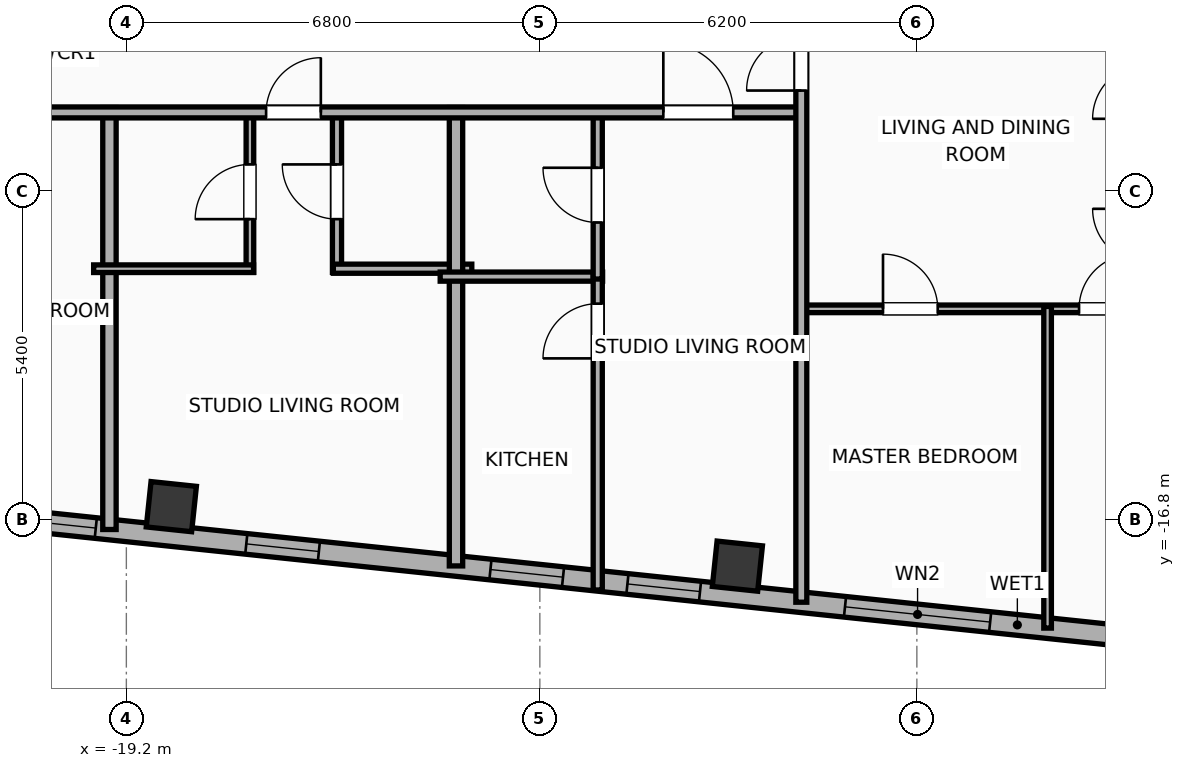
"""IFC4 building model, lengths in metres.
Left out: names, types, materials, properties, quantities, classifications, styles, units other than length and angle.
Written with IfcOpenShell. Run it as: python <this file> out.ifc"""

import sys

from ifc_helpers import new_model, si_unit, direction, frame, frame_2d, origin, origin_2d, place, context, subcontext, project, spatial, rectangle, hollow_rectangle, extrude, element, fill, save


model = new_model("IFC4")
c1 = context("Model", 3, precision=1e-05, world=origin(), true_north=direction((0.0, 1.0)))
c2 = subcontext(c1, "Body", "Model", "MODEL_VIEW")
j1 = project(units=[si_unit("LENGTHUNIT", "METRE"), si_unit("PLANEANGLEUNIT", "RADIAN")], contexts=[c1])
p1 = place(None, origin())
s1 = spatial("IfcSite", under=j1, at=p1, CompositionType="ELEMENT")
p2 = place(p1, origin())
s2 = spatial("IfcBuilding", under=s1, at=p2, CompositionType="ELEMENT")
p3 = place(p2, frame((0.0, 0.0, 260.0)))
s3 = spatial("IfcBuildingStorey", under=s2, at=p3, CompositionType="ELEMENT", Elevation=260.0)
for number, where, z_axis, x_axis in (
    (1, (-18.46, -16.583, 0.0), (0.0, 0.0, 1.0), (0.995, -0.105, 0.0)),
    (2, (-9.152, -17.561, 0.0), (0.0, 0.0, 1.0), (0.995, -0.105, 0.0)),
):
    element("IfcColumn", number, at=place(p3, frame(where, z_axis=z_axis, x_axis=x_axis)), inside=s3, PredefinedType="COLUMN", context=c2, shape_type="SweptSolid", body=[
        extrude(hollow_rectangle(XDim=0.75, YDim=0.75, WallThickness=0.025, at=origin_2d()), origin(), (0.0, 0.0, 1.0), 3.9),
    ])
p4 = place(p3, frame((18.708, -20.972, 0.0), z_axis=(0.0, 0.0, 1.0), x_axis=(-0.994521888554, 0.104528528102, 0.0)))
e3 = element("IfcWall", 3, at=p4, inside=s3, PredefinedType="ELEMENTEDWALL", context=c2, shape_type="SweptSolid", body=[
    extrude(rectangle(XDim=46.766, YDim=0.34, at=frame_2d((23.383, 0.0))), origin(), (0.0, 0.0, 1.0), 2.54),
])
p5 = place(p4, frame((23.833, 0.0, 0.75)))
e4 = element("IfcOpeningElement", 4, at=p5, cuts=e3, PredefinedType="OPENING", context=c2, shape_type="SweptSolid", body=[
    extrude(rectangle(XDim=2.4, YDim=1.63, at=frame_2d((1.2, 0.815))), frame((0.0, 0.18, 0.0), z_axis=(0.0, -1.0, 0.0), x_axis=(1.0, 0.0, 0.0)), (0.0, 0.0, 1.0), 0.36),
])
p6 = place(p4, frame((38.622, 0.0, 0.75)))
e5 = element("IfcOpeningElement", 5, at=p6, cuts=e3, PredefinedType="OPENING", context=c2, shape_type="SweptSolid", body=[
    extrude(rectangle(XDim=2.4, YDim=1.63, at=frame_2d((1.2, 0.815))), frame((0.0, 0.18, 0.0), z_axis=(0.0, -1.0, 0.0), x_axis=(1.0, 0.0, 0.0)), (0.0, 0.0, 1.0), 0.36),
])
p7 = place(p4, frame((44.402, 0.0, 0.75)))
e6 = element("IfcOpeningElement", 6, at=p7, cuts=e3, PredefinedType="OPENING", context=c2, shape_type="SweptSolid", body=[
    extrude(rectangle(XDim=1.2, YDim=1.63, at=frame_2d((0.6, 0.815))), frame((0.0, 0.18, 0.0), z_axis=(0.0, -1.0, 0.0), x_axis=(1.0, 0.0, 0.0)), (0.0, 0.0, 1.0), 0.36),
])
p8 = place(p4, frame((42.406, 0.0, 0.75)))
e7 = element("IfcOpeningElement", 7, at=p8, cuts=e3, PredefinedType="OPENING", context=c2, shape_type="SweptSolid", body=[
    extrude(rectangle(XDim=1.2, YDim=1.63, at=frame_2d((0.6, 0.815))), frame((0.0, 0.18, 0.0), z_axis=(0.0, -1.0, 0.0), x_axis=(1.0, 0.0, 0.0)), (0.0, 0.0, 1.0), 0.36),
])
p9 = place(p4, frame((34.933, 0.0, 0.75)))
e8 = element("IfcOpeningElement", 8, at=p9, cuts=e3, PredefinedType="OPENING", context=c2, shape_type="SweptSolid", body=[
    extrude(rectangle(XDim=1.2, YDim=1.63, at=frame_2d((0.6, 0.815))), frame((0.0, 0.18, 0.0), z_axis=(0.0, -1.0, 0.0), x_axis=(1.0, 0.0, 0.0)), (0.0, 0.0, 1.0), 0.36),
])
p10 = place(p4, frame((28.631, 0.0, 0.75)))
e9 = element("IfcOpeningElement", 9, at=p10, cuts=e3, PredefinedType="OPENING", context=c2, shape_type="SweptSolid", body=[
    extrude(rectangle(XDim=1.2, YDim=1.63, at=frame_2d((0.6, 0.815))), frame((0.0, 0.18, 0.0), z_axis=(0.0, -1.0, 0.0), x_axis=(1.0, 0.0, 0.0)), (0.0, 0.0, 1.0), 0.36),
])
p11 = place(p4, frame((30.896, 0.0, 0.75)))
e10 = element("IfcOpeningElement", 10, at=p11, cuts=e3, PredefinedType="OPENING", context=c2, shape_type="SweptSolid", body=[
    extrude(rectangle(XDim=1.2, YDim=1.63, at=frame_2d((0.6, 0.815))), frame((0.0, 0.18, 0.0), z_axis=(0.0, -1.0, 0.0), x_axis=(1.0, 0.0, 0.0)), (0.0, 0.0, 1.0), 0.36),
])
p12 = place(p4, frame((7.492, 0.0, 0.75)))
e11 = element("IfcOpeningElement", 11, at=p12, cuts=e3, PredefinedType="OPENING", context=c2, shape_type="SweptSolid", body=[
    extrude(rectangle(XDim=1.2, YDim=1.63, at=frame_2d((0.6, 0.815))), frame((0.0, 0.18, 0.0), z_axis=(0.0, -1.0, 0.0), x_axis=(1.0, 0.0, 0.0)), (0.0, 0.0, 1.0), 0.36),
])
p13 = place(p4, frame((4.141, 0.0, 0.75)))
e12 = element("IfcOpeningElement", 12, at=p13, cuts=e3, PredefinedType="OPENING", context=c2, shape_type="SweptSolid", body=[
    extrude(rectangle(XDim=1.2, YDim=1.63, at=frame_2d((0.6, 0.815))), frame((0.0, 0.18, 0.0), z_axis=(0.0, -1.0, 0.0), x_axis=(1.0, 0.0, 0.0)), (0.0, 0.0, 1.0), 0.36),
])
p14 = place(p4, frame((1.36, 0.0, 0.75)))
e13 = element("IfcOpeningElement", 13, at=p14, cuts=e3, PredefinedType="OPENING", context=c2, shape_type="SweptSolid", body=[
    extrude(rectangle(XDim=1.2, YDim=1.63, at=frame_2d((0.6, 0.815))), frame((0.0, 0.18, 0.0), z_axis=(0.0, -1.0, 0.0), x_axis=(1.0, 0.0, 0.0)), (0.0, 0.0, 1.0), 0.36),
])
p15 = place(p4, frame((20.254, 0.0, 0.75)))
e14 = element("IfcOpeningElement", 14, at=p15, cuts=e3, PredefinedType="OPENING", context=c2, shape_type="SweptSolid", body=[
    extrude(rectangle(XDim=1.2, YDim=1.63, at=frame_2d((0.6, 0.815))), frame((0.0, 0.18, 0.0), z_axis=(0.0, -1.0, 0.0), x_axis=(1.0, 0.0, 0.0)), (0.0, 0.0, 1.0), 0.36),
])
p16 = place(p4, frame((16.172, 0.0, 0.75)))
e15 = element("IfcOpeningElement", 15, at=p16, cuts=e3, PredefinedType="OPENING", context=c2, shape_type="SweptSolid", body=[
    extrude(rectangle(XDim=1.2, YDim=1.63, at=frame_2d((0.6, 0.815))), frame((0.0, 0.18, 0.0), z_axis=(0.0, -1.0, 0.0), x_axis=(1.0, 0.0, 0.0)), (0.0, 0.0, 1.0), 0.36),
])
p17 = place(p4, frame((12.11, 0.0, 0.75)))
e16 = element("IfcOpeningElement", 16, at=p17, cuts=e3, PredefinedType="OPENING", context=c2, shape_type="SweptSolid", body=[
    extrude(rectangle(XDim=1.2, YDim=1.63, at=frame_2d((0.6, 0.815))), frame((0.0, 0.18, 0.0), z_axis=(0.0, -1.0, 0.0), x_axis=(1.0, 0.0, 0.0)), (0.0, 0.0, 1.0), 0.36),
])
p18 = place(p3, frame((-19.478, -16.959, 0.0), z_axis=(0.0, 0.0, 1.0), x_axis=(0.0, 1.0, 0.0)))
e17 = element("IfcWall", 17, at=p18, inside=s3, PredefinedType="PARTITIONING", context=c2, shape_type="SweptSolid", body=[
    extrude(rectangle(XDim=6.939, YDim=0.22, at=frame_2d((3.469, 0.0))), origin(), (0.0, 0.0, 1.0), 2.54),
])
p19 = place(p3, frame((-17.168, -12.73, 0.0), z_axis=(0.0, 0.0, 1.0), x_axis=(0.0, 1.0, 0.0)))
e18 = element("IfcWall", 18, at=p19, inside=s3, PredefinedType="PARTITIONING", context=c2, shape_type="SweptSolid", body=[
    extrude(rectangle(XDim=2.65, YDim=0.125, at=frame_2d((1.325, 0.0))), origin(), (0.0, 0.0, 1.0), 3.65),
])
p20 = place(p19, frame((0.875, 0.0, 0.0)))
e19 = element("IfcOpeningElement", 19, at=p20, cuts=e18, PredefinedType="OPENING", context=c2, shape_type="SweptSolid", body=[
    extrude(rectangle(XDim=0.9, YDim=2.05, at=frame_2d((0.45, 1.025))), frame((0.0, 0.073, 0.0), z_axis=(0.0, -1.0, 0.0), x_axis=(1.0, 0.0, 0.0)), (0.0, 0.0, 1.0), 0.145),
])
p21 = place(p3, frame((-15.736, -12.73, 0.0), z_axis=(0.0, 0.0, 1.0), x_axis=(0.0, 1.0, 0.0)))
e20 = element("IfcWall", 20, at=p21, inside=s3, PredefinedType="PLUMBINGWALL", context=c2, shape_type="SweptSolid", body=[
    extrude(rectangle(XDim=2.65, YDim=0.15, at=frame_2d((1.325, 0.0))), origin(), (0.0, 0.0, 1.0), 3.65),
])
p22 = place(p21, frame((0.875, 0.0, 0.0)))
e21 = element("IfcOpeningElement", 21, at=p22, cuts=e20, PredefinedType="OPENING", context=c2, shape_type="SweptSolid", body=[
    extrude(rectangle(XDim=0.9, YDim=2.05, at=frame_2d((0.45, 1.025))), frame((0.0, 0.085, 0.0), z_axis=(0.0, -1.0, 0.0), x_axis=(1.0, 0.0, 0.0)), (0.0, 0.0, 1.0), 0.17),
])
p23 = place(p3, frame((-19.738, -12.67, 0.0), z_axis=(0.0, 0.0, 1.0), x_axis=(1.0, 0.0, 0.0)))
e22 = element("IfcWall", 22, at=p23, inside=s3, PredefinedType="PARTITIONING", context=c2, shape_type="SweptSolid", body=[
    extrude(rectangle(XDim=2.63, YDim=0.125, at=frame_2d((1.315, 0.0))), origin(), (0.0, 0.0, 1.0), 3.65),
])
p24 = place(p3, frame((-15.796, -12.67, 0.0), z_axis=(0.0, 0.0, 1.0), x_axis=(1.0, 0.0, 0.0)))
e23 = element("IfcWall", 23, at=p24, inside=s3, PredefinedType="PLUMBINGWALL", context=c2, shape_type="SweptSolid", body=[
    extrude(rectangle(XDim=2.277, YDim=0.15, at=frame_2d((1.138, 0.0))), origin(), (0.0, 0.0, 1.0), 3.65),
])
p25 = place(p3, frame((-13.779, -17.558, 0.0), z_axis=(0.0, 0.0, 1.0), x_axis=(0.0, 1.0, 0.0)))
e24 = element("IfcWall", 24, at=p25, inside=s3, PredefinedType="PARTITIONING", context=c2, shape_type="SweptSolid", body=[
    extrude(rectangle(XDim=7.538, YDim=0.22, at=frame_2d((3.769, 0.0))), origin(), (0.0, 0.0, 1.0), 3.65),
])
p26 = place(p3, frame((-14.039, -12.8, 0.0), z_axis=(0.0, 0.0, 1.0), x_axis=(1.0, 0.0, 0.0)))
e25 = element("IfcWall", 25, at=p26, inside=s3, PredefinedType="PLUMBINGWALL", context=c2, shape_type="SweptSolid", body=[
    extrude(rectangle(XDim=2.671, YDim=0.15, at=frame_2d((1.335, 0.0))), origin(), (0.0, 0.0, 1.0), 3.65),
])
p27 = place(p3, frame((-11.448, -17.954, 0.0), z_axis=(0.0, 0.0, 1.0), x_axis=(0.0, 1.0, 0.0)))
e26 = element("IfcWall", 26, at=p27, inside=s3, PredefinedType="PLUMBINGWALL", context=c2, shape_type="SweptSolid", body=[
    extrude(rectangle(XDim=5.194, YDim=0.15, at=frame_2d((2.597, 0.0))), origin(), (0.0, 0.0, 1.0), 3.65),
])
p28 = place(p27, frame((3.809, 0.0, 0.0)))
e27 = element("IfcOpeningElement", 27, at=p28, cuts=e26, PredefinedType="OPENING", context=c2, shape_type="SweptSolid", body=[
    extrude(rectangle(XDim=0.9, YDim=2.05, at=frame_2d((0.45, 1.025))), frame((0.0, 0.085, 0.0), z_axis=(0.0, -1.0, 0.0), x_axis=(1.0, 0.0, 0.0)), (0.0, 0.0, 1.0), 0.17),
])
p29 = place(p3, frame((-11.448, -12.84, 0.0), z_axis=(0.0, 0.0, 1.0), x_axis=(0.0, 1.0, 0.0)))
e28 = element("IfcWall", 28, at=p29, inside=s3, PredefinedType="PLUMBINGWALL", context=c2, shape_type="SweptSolid", body=[
    extrude(rectangle(XDim=2.76, YDim=0.15, at=frame_2d((1.38, 0.0))), origin(), (0.0, 0.0, 1.0), 2.54),
])
p30 = place(p29, frame((0.93, 0.0, 0.0)))
e29 = element("IfcOpeningElement", 29, at=p30, cuts=e28, PredefinedType="OPENING", context=c2, shape_type="SweptSolid", body=[
    extrude(rectangle(XDim=0.9, YDim=2.05, at=frame_2d((0.45, 1.025))), frame((0.0, 0.085, 0.0), z_axis=(0.0, -1.0, 0.0), x_axis=(1.0, 0.0, 0.0)), (0.0, 0.0, 1.0), 0.17),
])
p31 = place(p3, frame((-30.639, -10.1, 0.0), z_axis=(0.0, 0.0, 1.0), x_axis=(1.0, 0.0, 0.0)))
e30 = element("IfcWall", 30, at=p31, inside=s3, PredefinedType="PARTITIONING", context=c2, shape_type="SweptSolid", body=[
    extrude(rectangle(XDim=22.559, YDim=0.18, at=frame_2d((11.28, 0.0))), origin(), (0.0, 0.0, 1.0), 3.65),
])
p32 = place(p31, frame((2.298, 0.0, 0.0)))
e31 = element("IfcOpeningElement", 31, at=p32, cuts=e30, PredefinedType="OPENING", context=c2, shape_type="SweptSolid", body=[
    extrude(rectangle(XDim=0.9, YDim=2.05, at=frame_2d((0.45, 1.025))), frame((0.0, 0.1, 0.0), z_axis=(0.0, -1.0, 0.0), x_axis=(1.0, 0.0, 0.0)), (0.0, 0.0, 1.0), 0.2),
])
p33 = place(p31, frame((8.823, 0.0, 0.0)))
e32 = element("IfcOpeningElement", 32, at=p33, cuts=e30, PredefinedType="OPENING", context=c2, shape_type="SweptSolid", body=[
    extrude(rectangle(XDim=1.15, YDim=2.05, at=frame_2d((0.575, 1.025))), frame((0.0, 0.1, 0.0), z_axis=(0.0, -1.0, 0.0), x_axis=(1.0, 0.0, 0.0)), (0.0, 0.0, 1.0), 0.2),
])
p34 = place(p31, frame((13.738, 0.0, 0.0)))
e33 = element("IfcOpeningElement", 33, at=p34, cuts=e30, PredefinedType="OPENING", context=c2, shape_type="SweptSolid", body=[
    extrude(rectangle(XDim=0.9, YDim=2.05, at=frame_2d((0.45, 1.025))), frame((0.0, 0.1, 0.0), z_axis=(0.0, -1.0, 0.0), x_axis=(1.0, 0.0, 0.0)), (0.0, 0.0, 1.0), 0.2),
])
p35 = place(p31, frame((20.27, 0.0, 0.0)))
e34 = element("IfcOpeningElement", 34, at=p35, cuts=e30, PredefinedType="OPENING", context=c2, shape_type="SweptSolid", body=[
    extrude(rectangle(XDim=1.15, YDim=2.05, at=frame_2d((0.575, 1.025))), frame((0.0, 0.1, 0.0), z_axis=(0.0, -1.0, 0.0), x_axis=(1.0, 0.0, 0.0)), (0.0, 0.0, 1.0), 0.2),
])
p36 = place(p3, frame((-8.08, -13.33, 0.0), z_axis=(0.0, 0.0, 1.0), x_axis=(1.0, 0.0, 0.0)))
e35 = element("IfcWall", 35, at=p36, inside=s3, PredefinedType="PARTITIONING", context=c2, shape_type="SweptSolid", body=[
    extrude(rectangle(XDim=8.06, YDim=0.125, at=frame_2d((4.03, 0.0))), origin(), (0.0, 0.0, 1.0), 3.65),
])
p37 = place(p36, frame((1.323, 0.0, 0.0)))
e36 = element("IfcOpeningElement", 36, at=p37, cuts=e35, PredefinedType="OPENING", context=c2, shape_type="SweptSolid", body=[
    extrude(rectangle(XDim=0.9, YDim=2.05, at=frame_2d((0.45, 1.025))), frame((0.0, 0.073, 0.0), z_axis=(0.0, -1.0, 0.0), x_axis=(1.0, 0.0, 0.0)), (0.0, 0.0, 1.0), 0.145),
])
p38 = place(p36, frame((4.547, 0.0, 0.0)))
e37 = element("IfcOpeningElement", 37, at=p38, cuts=e35, PredefinedType="OPENING", context=c2, shape_type="SweptSolid", body=[
    extrude(rectangle(XDim=0.9, YDim=2.05, at=frame_2d((0.45, 1.025))), frame((0.0, 0.073, 0.0), z_axis=(0.0, -1.0, 0.0), x_axis=(1.0, 0.0, 0.0)), (0.0, 0.0, 1.0), 0.145),
])
p39 = place(p3, frame((-4.05, -18.58, 0.0), z_axis=(0.0, 0.0, 1.0), x_axis=(0.0, 1.0, 0.0)))
e38 = element("IfcWall", 38, at=p39, inside=s3, PredefinedType="PARTITIONING", context=c2, shape_type="SweptSolid", body=[
    extrude(rectangle(XDim=5.29, YDim=0.125, at=frame_2d((2.645, 0.0))), origin(), (0.0, 0.0, 1.0), 3.65),
])
p40 = place(p3, frame((-8.1, -18.155, 0.0), z_axis=(0.0, 0.0, 1.0), x_axis=(0.0, 1.0, 0.0)))
e39 = element("IfcWall", 39, at=p40, inside=s3, PredefinedType="PARTITIONING", context=c2, shape_type="SweptSolid", body=[
    extrude(rectangle(XDim=9.665, YDim=0.18, at=frame_2d((4.832, 0.0))), origin(), (0.0, 0.0, 1.0), 3.65),
])
p41 = place(p40, frame((8.414, 0.0, 0.0)))
e40 = element("IfcOpeningElement", 40, at=p41, cuts=e39, PredefinedType="OPENING", context=c2, shape_type="SweptSolid", body=[
    extrude(rectangle(XDim=0.9, YDim=2.05, at=frame_2d((0.45, 1.025))), frame((0.0, 0.1, 0.0), z_axis=(0.0, -1.0, 0.0), x_axis=(1.0, 0.0, 0.0)), (0.0, 0.0, 1.0), 0.2),
])
p42 = place(p5, origin())
e41 = element("IfcWindow", 41, at=p42, inside=s3, PartitioningType="SINGLE_PANEL", PredefinedType="WINDOW", context=c2, shape_type="SweptSolid", body=[
    extrude(rectangle(XDim=2.4, YDim=1.63, at=frame_2d((1.2, 0.815))), frame((0.0, 0.03, 0.0), z_axis=(0.0, -1.0, 0.0), x_axis=(1.0, 0.0, 0.0)), (0.0, 0.0, 1.0), 0.06),
])
fill(e4, e41)
p43 = place(p6, origin())
e42 = element("IfcWindow", 42, at=p43, inside=s3, PartitioningType="SINGLE_PANEL", PredefinedType="WINDOW", context=c2, shape_type="SweptSolid", body=[
    extrude(rectangle(XDim=2.4, YDim=1.63, at=frame_2d((1.2, 0.815))), frame((0.0, 0.03, 0.0), z_axis=(0.0, -1.0, 0.0), x_axis=(1.0, 0.0, 0.0)), (0.0, 0.0, 1.0), 0.06),
])
fill(e5, e42)
p44 = place(p9, origin())
e43 = element("IfcWindow", 43, at=p44, inside=s3, PartitioningType="SINGLE_PANEL", PredefinedType="WINDOW", context=c2, shape_type="SweptSolid", body=[
    extrude(rectangle(XDim=1.2, YDim=1.63, at=frame_2d((0.6, 0.815))), frame((0.0, 0.03, 0.0), z_axis=(0.0, -1.0, 0.0), x_axis=(1.0, 0.0, 0.0)), (0.0, 0.0, 1.0), 0.06),
])
fill(e8, e43)
p45 = place(p10, origin())
e44 = element("IfcWindow", 44, at=p45, inside=s3, PartitioningType="SINGLE_PANEL", PredefinedType="WINDOW", context=c2, shape_type="SweptSolid", body=[
    extrude(rectangle(XDim=1.2, YDim=1.63, at=frame_2d((0.6, 0.815))), frame((0.0, 0.03, 0.0), z_axis=(0.0, -1.0, 0.0), x_axis=(1.0, 0.0, 0.0)), (0.0, 0.0, 1.0), 0.06),
])
fill(e9, e44)
p46 = place(p11, origin())
e45 = element("IfcWindow", 45, at=p46, inside=s3, PartitioningType="SINGLE_PANEL", PredefinedType="WINDOW", context=c2, shape_type="SweptSolid", body=[
    extrude(rectangle(XDim=1.2, YDim=1.63, at=frame_2d((0.6, 0.815))), frame((0.0, 0.03, 0.0), z_axis=(0.0, -1.0, 0.0), x_axis=(1.0, 0.0, 0.0)), (0.0, 0.0, 1.0), 0.06),
])
fill(e10, e45)
p47 = place(p20, origin())
e46 = element("IfcDoor", 46, at=p47, inside=s3, OperationType="SINGLE_SWING_LEFT", PredefinedType="DOOR", context=c2, shape_type="SweptSolid", body=[
    extrude(rectangle(XDim=0.9, YDim=2.05, at=frame_2d((0.45, 1.025))), frame((0.0, 0.025, 0.0), z_axis=(0.0, -1.0, 0.0), x_axis=(1.0, 0.0, 0.0)), (0.0, 0.0, 1.0), 0.05),
])
fill(e19, e46)
p48 = place(p22, origin())
e47 = element("IfcDoor", 47, at=p48, inside=s3, OperationType="SINGLE_SWING_RIGHT", PredefinedType="DOOR", context=c2, shape_type="SweptSolid", body=[
    extrude(rectangle(XDim=0.9, YDim=2.05, at=frame_2d((0.45, 1.025))), frame((0.0, 0.025, 0.0), z_axis=(0.0, -1.0, 0.0), x_axis=(1.0, 0.0, 0.0)), (0.0, 0.0, 1.0), 0.05),
])
fill(e21, e47)
p49 = place(p28, origin())
e48 = element("IfcDoor", 48, at=p49, inside=s3, OperationType="SINGLE_SWING_LEFT", PredefinedType="DOOR", context=c2, shape_type="SweptSolid", body=[
    extrude(rectangle(XDim=0.9, YDim=2.05, at=frame_2d((0.45, 1.025))), frame((0.0, 0.025, 0.0), z_axis=(0.0, -1.0, 0.0), x_axis=(1.0, 0.0, 0.0)), (0.0, 0.0, 1.0), 0.05),
])
fill(e27, e48)
p50 = place(p30, origin())
e49 = element("IfcDoor", 49, at=p50, inside=s3, OperationType="SINGLE_SWING_RIGHT", PredefinedType="DOOR", context=c2, shape_type="SweptSolid", body=[
    extrude(rectangle(XDim=0.9, YDim=2.05, at=frame_2d((0.45, 1.025))), frame((0.0, 0.025, 0.0), z_axis=(0.0, -1.0, 0.0), x_axis=(1.0, 0.0, 0.0)), (0.0, 0.0, 1.0), 0.05),
])
fill(e29, e49)
p51 = place(p34, origin())
e50 = element("IfcDoor", 50, at=p51, inside=s3, OperationType="SINGLE_SWING_RIGHT", PredefinedType="DOOR", context=c2, shape_type="SweptSolid", body=[
    extrude(rectangle(XDim=0.9, YDim=2.05, at=frame_2d((0.45, 1.025))), frame((0.0, 0.025, 0.0), z_axis=(0.0, -1.0, 0.0), x_axis=(1.0, 0.0, 0.0)), (0.0, 0.0, 1.0), 0.05),
])
fill(e33, e50)
p52 = place(p35, origin())
e51 = element("IfcDoor", 51, at=p52, inside=s3, OperationType="SINGLE_SWING_LEFT", PredefinedType="DOOR", context=c2, shape_type="SweptSolid", body=[
    extrude(rectangle(XDim=1.15, YDim=2.05, at=frame_2d((0.575, 1.025))), frame((0.0, 0.025, 0.0), z_axis=(0.0, -1.0, 0.0), x_axis=(1.0, 0.0, 0.0)), (0.0, 0.0, 1.0), 0.05),
])
fill(e34, e51)
p53 = place(p37, origin())
e52 = element("IfcDoor", 52, at=p53, inside=s3, OperationType="SINGLE_SWING_LEFT", PredefinedType="DOOR", context=c2, shape_type="SweptSolid", body=[
    extrude(rectangle(XDim=0.9, YDim=2.05, at=frame_2d((0.45, 1.025))), frame((0.0, 0.025, 0.0), z_axis=(0.0, -1.0, 0.0), x_axis=(1.0, 0.0, 0.0)), (0.0, 0.0, 1.0), 0.05),
])
fill(e36, e52)
p54 = place(p38, origin())
e53 = element("IfcDoor", 53, at=p54, inside=s3, OperationType="SINGLE_SWING_RIGHT", PredefinedType="DOOR", context=c2, shape_type="SweptSolid", body=[
    extrude(rectangle(XDim=0.9, YDim=2.05, at=frame_2d((0.45, 1.025))), frame((0.0, 0.025, 0.0), z_axis=(0.0, -1.0, 0.0), x_axis=(1.0, 0.0, 0.0)), (0.0, 0.0, 1.0), 0.05),
])
fill(e37, e53)
p55 = place(p41, origin())
e54 = element("IfcDoor", 54, at=p55, inside=s3, OperationType="SINGLE_SWING_LEFT", PredefinedType="DOOR", context=c2, shape_type="SweptSolid", body=[
    extrude(rectangle(XDim=0.9, YDim=2.05, at=frame_2d((0.45, 1.025))), frame((0.0, 0.025, 0.0), z_axis=(0.0, -1.0, 0.0), x_axis=(1.0, 0.0, 0.0)), (0.0, 0.0, 1.0), 0.05),
])
fill(e40, e54)
save(model, sys.argv[1])
